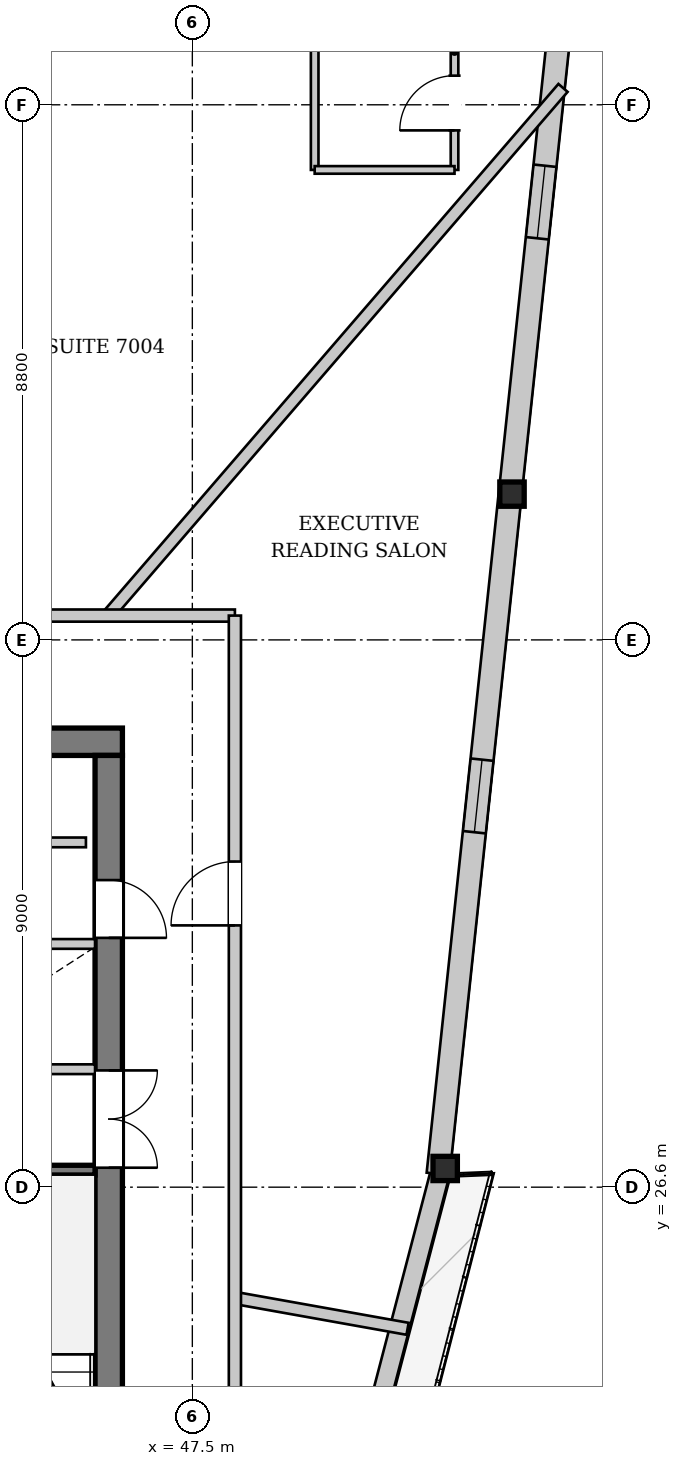
"""IFC4 building model, lengths in metres.
Left out: names, types, materials, properties, quantities, classifications, styles, units other than length and angle.
Written with IfcOpenShell. Run it as: python <this file> out.ifc"""

import sys

from ifc_helpers import new_model, si_unit, direction, frame, frame_2d, origin, origin_2d, place, context, subcontext, project, spatial, rectangle, i_section, extrude, source, transform, mapped, element, fill, save


model = new_model("IFC4")
c1 = context("Model", 3, precision=1e-05, world=origin(), true_north=direction((0.0, 1.0)))
c2 = subcontext(c1, "Body", "Model", "MODEL_VIEW")
j1 = project(units=[si_unit("LENGTHUNIT", "METRE"), si_unit("PLANEANGLEUNIT", "RADIAN")], contexts=[c1])
p1 = place(None, origin())
s1 = spatial("IfcSite", under=j1, at=p1, CompositionType="ELEMENT")
p2 = place(p1, origin())
s2 = spatial("IfcBuilding", under=s1, at=p2, CompositionType="ELEMENT")
p3 = place(p2, frame((0.0, 0.0, 263.3)))
s3 = spatial("IfcBuildingStorey", under=s2, at=p3, CompositionType="ELEMENT", Elevation=263.3)
m1 = source(origin(), c2, "Body", "SweptSolid", [
    extrude(i_section(OverallWidth=0.401, OverallDepth=0.399, WebThickness=0.022, FlangeThickness=0.034, at=origin_2d()), origin(), (0.0, 0.0, 1.0), 3.445),
])
p4 = place(p3, frame((51.732, 26.798, 0.0), z_axis=(-0.042519230303, 0.063495383919, 0.997075950605), x_axis=(-0.830907176976, -0.55641105601, 0.0)))
e1 = element("IfcColumn", 1, at=p4, inside=s3, PredefinedType="COLUMN", context=c2, shape_type="MappedRepresentation", body=[
    mapped(m1, transform((0.0, 0.0, 0.0), x_axis=(1.0, 0.0, 0.0), y_axis=(0.0, 1.0, 0.0), z_axis=(0.0, 0.0, 1.0), scale=1.0)),
])
m2 = source(origin(), c2, "Body", "SweptSolid", [
    extrude(i_section(OverallWidth=0.401, OverallDepth=0.399, WebThickness=0.022, FlangeThickness=0.034, at=origin_2d()), origin(), (0.0, 0.0, 1.0), 3.454),
])
p5 = place(p3, frame((52.908, 37.897, 0.0), z_axis=(-0.087222439843, 0.057889123364, 0.994505452667), x_axis=(-0.552985061708, -0.833191167457, 0.0)))
e2 = element("IfcColumn", 2, at=p5, inside=s3, PredefinedType="COLUMN", context=c2, shape_type="MappedRepresentation", body=[
    mapped(m2, transform((0.0, 0.0, 0.0), x_axis=(1.0, 0.0, 0.0), y_axis=(0.0, 1.0, 0.0), z_axis=(0.0, 0.0, 1.0), scale=1.0)),
])
p6 = place(p3, frame((51.577, 26.839, 0.0), z_axis=(0.0, 0.0, 1.0), x_axis=(-0.252928525252, -0.967484966867, 0.0)))
e3 = element("IfcWall", 3, at=p6, inside=s3, PredefinedType="SOLIDWALL", context=c2, shape_type="SweptSolid", body=[
    extrude(rectangle(XDim=22.323, YDim=0.32, at=frame_2d((11.161, 0.0))), origin(), (0.0, 0.0, 1.0), 2.872),
])
p7 = place(p6, frame((6.393, 0.0, 0.0)))
e4 = element("IfcOpeningElement", 4, at=p7, cuts=e3, PredefinedType="OPENING", context=c2, shape_type="SweptSolid", body=[
    extrude(rectangle(XDim=1.5, YDim=2.3, at=frame_2d((0.75, 1.15))), frame((0.0, 0.17, 0.0), z_axis=(0.0, -1.0, 0.0), x_axis=(1.0, 0.0, 0.0)), (0.0, 0.0, 1.0), 0.34),
])
p8 = place(p6, frame((15.219, 0.0, 0.402)))
e5 = element("IfcOpeningElement", 5, at=p8, cuts=e3, PredefinedType="OPENING", context=c2, shape_type="SweptSolid", body=[
    extrude(rectangle(XDim=2.6, YDim=2.35, at=frame_2d((1.3, 1.175))), frame((0.0, 0.17, 0.0), z_axis=(0.0, -1.0, 0.0), x_axis=(1.0, 0.0, 0.0)), (0.0, 0.0, 1.0), 0.34),
])
p9 = place(p3, frame((33.346, 39.708, 0.0), z_axis=(0.0, 0.0, 1.0), x_axis=(0.884171130731, 0.467163153066, 0.0)))
e6 = element("IfcWall", 6, at=p9, inside=s3, PredefinedType="SOLIDWALL", context=c2, shape_type="SweptSolid", body=[
    extrude(rectangle(XDim=21.802, YDim=0.32, at=frame_2d((10.901, 0.0))), origin(), (0.0, 0.0, 1.0), 2.872),
])
p10 = place(p9, frame((6.227, 0.0, 0.0)))
e7 = element("IfcOpeningElement", 7, at=p10, cuts=e6, PredefinedType="OPENING", context=c2, shape_type="SweptSolid", body=[
    extrude(rectangle(XDim=1.5, YDim=2.3, at=frame_2d((0.75, 1.15))), frame((0.0, 0.17, 0.0), z_axis=(0.0, -1.0, 0.0), x_axis=(1.0, 0.0, 0.0)), (0.0, 0.0, 1.0), 0.34),
])
p11 = place(p9, frame((14.834, 0.0, 0.402)))
e8 = element("IfcOpeningElement", 8, at=p11, cuts=e6, PredefinedType="OPENING", context=c2, shape_type="SweptSolid", body=[
    extrude(rectangle(XDim=2.6, YDim=2.35, at=frame_2d((1.3, 1.175))), frame((0.0, 0.17, 0.0), z_axis=(0.0, -1.0, 0.0), x_axis=(1.0, 0.0, 0.0)), (0.0, 0.0, 1.0), 0.34),
])
p12 = place(p3, frame((53.896, 49.017, 0.0), z_axis=(0.0, 0.0, 1.0), x_axis=(-0.105399254058, -0.994429986095, 0.0)))
e9 = element("IfcWall", 9, at=p12, inside=s3, PredefinedType="SOLIDWALL", context=c2, shape_type="SweptSolid", body=[
    extrude(rectangle(XDim=22.323, YDim=0.38, at=frame_2d((11.161, 0.0))), origin(), (0.0, 0.0, 1.0), 2.872),
])
p13 = place(p12, frame((5.65, 0.0, 0.65)))
e10 = element("IfcOpeningElement", 10, at=p13, cuts=e9, PredefinedType="OPENING", context=c2, shape_type="SweptSolid", body=[
    extrude(rectangle(XDim=1.2, YDim=1.5, at=frame_2d((0.6, 0.75))), frame((0.0, 0.2, 0.0), z_axis=(0.0, -1.0, 0.0), x_axis=(1.0, 0.0, 0.0)), (0.0, 0.0, 1.0), 0.4),
])
p14 = place(p12, frame((15.472, 0.0, 0.65)))
e11 = element("IfcOpeningElement", 11, at=p14, cuts=e9, PredefinedType="OPENING", context=c2, shape_type="SweptSolid", body=[
    extrude(rectangle(XDim=1.2, YDim=1.5, at=frame_2d((0.6, 0.75))), frame((0.0, 0.2, 0.0), z_axis=(0.0, -1.0, 0.0), x_axis=(1.0, 0.0, 0.0)), (0.0, 0.0, 1.0), 0.4),
])
p15 = place(p3, frame((29.65, 33.925, 0.0), z_axis=(0.0, 0.0, 1.0), x_axis=(1.0, 0.0, 0.0)))
e12 = element("IfcWall", 12, at=p15, inside=s3, PredefinedType="SHEAR", context=c2, shape_type="SweptSolid", body=[
    extrude(rectangle(XDim=16.7, YDim=0.45, at=frame_2d((8.35, 0.0))), origin(), (0.0, 0.0, 1.0), 3.38),
])
p16 = place(p15, frame((1.45, 0.0, 0.0)))
e13 = element("IfcOpeningElement", 13, at=p16, cuts=e12, PredefinedType="OPENING", context=c2, shape_type="SweptSolid", body=[
    extrude(rectangle(XDim=0.95, YDim=2.1, at=frame_2d((0.475, 1.05))), frame((0.0, 0.235, 0.0), z_axis=(0.0, -1.0, 0.0), x_axis=(1.0, 0.0, 0.0)), (0.0, 0.0, 1.0), 0.47),
])
p17 = place(p15, frame((3.83, 0.0, 0.0)))
e14 = element("IfcOpeningElement", 14, at=p17, cuts=e12, PredefinedType="OPENING", context=c2, shape_type="SweptSolid", body=[
    extrude(rectangle(XDim=1.32, YDim=2.2, at=frame_2d((0.66, 1.1))), frame((0.0, 0.235, 0.0), z_axis=(0.0, -1.0, 0.0), x_axis=(1.0, 0.0, 0.0)), (0.0, 0.0, 1.0), 0.47),
])
p18 = place(p3, frame((46.125, 33.7, 0.0), z_axis=(0.0, 0.0, 1.0), x_axis=(0.0, -1.0, 0.0)))
e15 = element("IfcWall", 15, at=p18, inside=s3, PredefinedType="SHEAR", context=c2, shape_type="SweptSolid", body=[
    extrude(rectangle(XDim=14.2, YDim=0.45, at=frame_2d((7.1, 0.0))), origin(), (0.0, 0.0, 1.0), 3.38),
])
p19 = place(p18, frame((5.18, 0.0, 0.0)))
e16 = element("IfcOpeningElement", 16, at=p19, cuts=e15, PredefinedType="OPENING", context=c2, shape_type="SweptSolid", body=[
    extrude(rectangle(XDim=1.6, YDim=2.2, at=frame_2d((0.8, 1.1))), frame((0.0, 0.235, 0.0), z_axis=(0.0, -1.0, 0.0), x_axis=(1.0, 0.0, 0.0)), (0.0, 0.0, 1.0), 0.47),
])
p20 = place(p18, frame((2.05, 0.0, 0.0)))
e17 = element("IfcOpeningElement", 17, at=p20, cuts=e15, PredefinedType="OPENING", context=c2, shape_type="SweptSolid", body=[
    extrude(rectangle(XDim=0.95, YDim=2.1, at=frame_2d((0.475, 1.05))), frame((0.0, 0.235, 0.0), z_axis=(0.0, -1.0, 0.0), x_axis=(1.0, 0.0, 0.0)), (0.0, 0.0, 1.0), 0.47),
])
p21 = place(p3, frame((42.88, 26.88, 0.0), z_axis=(0.0, 0.0, 1.0), x_axis=(1.0, 0.0, 0.0)))
e18 = element("IfcWall", 18, at=p21, inside=s3, PredefinedType="PARTITIONING", context=c2, shape_type="SweptSolid", body=[
    extrude(rectangle(XDim=3.02, YDim=0.16, at=frame_2d((1.51, 0.0))), origin(), (0.0, 0.0, 1.0), 3.38),
])
p22 = place(p3, frame((33.28, 28.54, 0.0), z_axis=(0.0, 0.0, 1.0), x_axis=(1.0, 0.0, 0.0)))
e19 = element("IfcWall", 19, at=p22, inside=s3, PredefinedType="PARTITIONING", context=c2, shape_type="SweptSolid", body=[
    extrude(rectangle(XDim=12.62, YDim=0.16, at=frame_2d((6.31, 0.0))), origin(), (0.0, 0.0, 1.0), 3.38),
])
p23 = place(p22, frame((0.26, 0.0, 0.0)))
e20 = element("IfcOpeningElement", 20, at=p23, cuts=e19, PredefinedType="OPENING", context=c2, shape_type="SweptSolid", body=[
    extrude(rectangle(XDim=1.1, YDim=2.2, at=frame_2d((0.55, 1.1))), frame((0.0, 0.09, 0.0), z_axis=(0.0, -1.0, 0.0), x_axis=(1.0, 0.0, 0.0)), (0.0, 0.0, 1.0), 0.18),
])
p24 = place(p22, frame((2.01, 0.0, 0.0)))
e21 = element("IfcOpeningElement", 21, at=p24, cuts=e19, PredefinedType="OPENING", context=c2, shape_type="SweptSolid", body=[
    extrude(rectangle(XDim=1.1, YDim=2.2, at=frame_2d((0.55, 1.1))), frame((0.0, 0.09, 0.0), z_axis=(0.0, -1.0, 0.0), x_axis=(1.0, 0.0, 0.0)), (0.0, 0.0, 1.0), 0.18),
])
p25 = place(p22, frame((3.76, 0.0, 0.0)))
e22 = element("IfcOpeningElement", 22, at=p25, cuts=e19, PredefinedType="OPENING", context=c2, shape_type="SweptSolid", body=[
    extrude(rectangle(XDim=1.1, YDim=2.2, at=frame_2d((0.55, 1.1))), frame((0.0, 0.09, 0.0), z_axis=(0.0, -1.0, 0.0), x_axis=(1.0, 0.0, 0.0)), (0.0, 0.0, 1.0), 0.18),
])
p26 = place(p3, frame((40.72, 30.6, 0.0), z_axis=(0.0, 0.0, 1.0), x_axis=(1.0, 0.0, 0.0)))
e23 = element("IfcWall", 23, at=p26, inside=s3, PredefinedType="PARTITIONING", context=c2, shape_type="SweptSolid", body=[
    extrude(rectangle(XDim=5.18, YDim=0.16, at=frame_2d((2.59, 0.0))), origin(), (0.0, 0.0, 1.0), 3.38),
])
p27 = place(p3, frame((40.72, 32.27, 0.0), z_axis=(0.0, 0.0, 1.0), x_axis=(1.0, 0.0, 0.0)))
e24 = element("IfcWall", 24, at=p27, inside=s3, PredefinedType="PARTITIONING", context=c2, shape_type="SweptSolid", body=[
    extrude(rectangle(XDim=5.03, YDim=0.16, at=frame_2d((2.515, 0.0))), origin(), (0.0, 0.0, 1.0), 3.38),
])
p28 = place(p27, frame((2.1, 0.0, 0.0)))
e25 = element("IfcOpeningElement", 25, at=p28, cuts=e24, PredefinedType="OPENING", context=c2, shape_type="SweptSolid", body=[
    extrude(rectangle(XDim=0.95, YDim=2.1, at=frame_2d((0.475, 1.05))), frame((0.0, 0.09, 0.0), z_axis=(0.0, -1.0, 0.0), x_axis=(1.0, 0.0, 0.0)), (0.0, 0.0, 1.0), 0.18),
])
p29 = place(p3, frame((48.2, 24.778, 0.0), z_axis=(0.0, 0.0, 1.0), x_axis=(0.984415019737, -0.175860936298, 0.0)))
e26 = element("IfcWall", 26, at=p29, inside=s3, PredefinedType="PARTITIONING", context=c2, shape_type="SweptSolid", body=[
    extrude(rectangle(XDim=2.885, YDim=0.2, at=frame_2d((1.442, 0.0))), origin(), (0.0, 0.0, 1.0), 3.38),
])
p30 = place(p3, frame((46.11, 36.0, 0.0), z_axis=(0.0, 0.0, 1.0), x_axis=(0.653228227984, 0.757161067518, 0.0)))
e27 = element("IfcWall", 27, at=p30, inside=s3, PredefinedType="PARTITIONING", context=c2, shape_type="SweptSolid", body=[
    extrude(rectangle(XDim=11.461, YDim=0.2, at=frame_2d((5.73, 0.0))), origin(), (0.0, 0.0, 1.0), 3.38),
])
p31 = place(p3, frame((51.812, 43.329, 0.0), z_axis=(0.0, 0.0, 1.0), x_axis=(0.0, 1.0, 0.0)))
e28 = element("IfcWall", 28, at=p31, inside=s3, PredefinedType="PARTITIONING", context=c2, shape_type="SweptSolid", body=[
    extrude(rectangle(XDim=2.2, YDim=0.125, at=frame_2d((1.1, 0.0))), origin(), (0.0, 0.0, 1.0), 3.38),
])
p32 = place(p31, frame((0.65, 0.0, 0.0)))
e29 = element("IfcOpeningElement", 29, at=p32, cuts=e28, PredefinedType="OPENING", context=c2, shape_type="SweptSolid", body=[
    extrude(rectangle(XDim=0.9, YDim=2.1, at=frame_2d((0.45, 1.05))), frame((0.0, 0.073, 0.0), z_axis=(0.0, -1.0, 0.0), x_axis=(1.0, 0.0, 0.0)), (0.0, 0.0, 1.0), 0.145),
])
p33 = place(p3, frame((49.512, 45.529, 0.0), z_axis=(0.0, 0.0, 1.0), x_axis=(0.0, -1.0, 0.0)))
e30 = element("IfcWall", 30, at=p33, inside=s3, PredefinedType="PARTITIONING", context=c2, shape_type="SweptSolid", body=[
    extrude(rectangle(XDim=2.2, YDim=0.125, at=frame_2d((1.1, 0.0))), origin(), (0.0, 0.0, 1.0), 3.055),
])
p34 = place(p3, frame((49.512, 43.329, 0.0), z_axis=(0.0, 0.0, 1.0), x_axis=(1.0, 0.0, 0.0)))
e31 = element("IfcWall", 31, at=p34, inside=s3, PredefinedType="PARTITIONING", context=c2, shape_type="SweptSolid", body=[
    extrude(rectangle(XDim=2.3, YDim=0.125, at=frame_2d((1.15, 0.0))), origin(), (0.0, 0.0, 1.0), 3.38),
])
p35 = place(p3, frame((43.4, 36.0, 0.0), z_axis=(0.0, 0.0, 1.0), x_axis=(1.0, 0.0, 0.0)))
e32 = element("IfcWall", 32, at=p35, inside=s3, PredefinedType="PARTITIONING", context=c2, shape_type="SweptSolid", body=[
    extrude(rectangle(XDim=4.8, YDim=0.2, at=frame_2d((2.4, 0.0))), origin(), (0.0, 0.0, 1.0), 3.38),
])
p36 = place(p3, frame((48.2, 17.2, 0.0), z_axis=(0.0, 0.0, 1.0), x_axis=(0.0, 1.0, 0.0)))
e33 = element("IfcWall", 33, at=p36, inside=s3, PredefinedType="PARTITIONING", context=c2, shape_type="SweptSolid", body=[
    extrude(rectangle(XDim=18.8, YDim=0.2, at=frame_2d((9.4, 0.0))), origin(), (0.0, 0.0, 1.0), 3.005),
])
p37 = place(p36, frame((0.3, 0.0, 0.0)))
e34 = element("IfcOpeningElement", 34, at=p37, cuts=e33, PredefinedType="OPENING", context=c2, shape_type="SweptSolid", body=[
    extrude(rectangle(XDim=1.05, YDim=2.2, at=frame_2d((0.525, 1.1))), frame((0.0, 0.11, 0.0), z_axis=(0.0, -1.0, 0.0), x_axis=(1.0, 0.0, 0.0)), (0.0, 0.0, 1.0), 0.22),
])
p38 = place(p36, frame((13.705, 0.0, 0.0)))
e35 = element("IfcOpeningElement", 35, at=p38, cuts=e33, PredefinedType="OPENING", context=c2, shape_type="SweptSolid", body=[
    extrude(rectangle(XDim=1.05, YDim=2.2, at=frame_2d((0.525, 1.1))), frame((0.0, 0.11, 0.0), z_axis=(0.0, -1.0, 0.0), x_axis=(1.0, 0.0, 0.0)), (0.0, 0.0, 1.0), 0.22),
])
m3 = source(origin(), c2, "Body", "SweptSolid", [
    extrude(rectangle(XDim=1.2, YDim=1.5, at=frame_2d((0.6, 0.75))), frame((0.0, 0.03, 0.0), z_axis=(0.0, -1.0, 0.0), x_axis=(1.0, 0.0, 0.0)), (0.0, 0.0, 1.0), 0.06),
])
p39 = place(p13, origin())
e36 = element("IfcWindow", 36, at=p39, inside=s3, PartitioningType="SINGLE_PANEL", PredefinedType="WINDOW", context=c2, shape_type="MappedRepresentation", body=[
    mapped(m3, transform((0.0, 0.0, 0.0), x_axis=(1.0, 0.0, 0.0), y_axis=(0.0, 1.0, 0.0), z_axis=(0.0, 0.0, 1.0), scale=1.0)),
])
fill(e10, e36)
p40 = place(p14, origin())
e37 = element("IfcWindow", 37, at=p40, inside=s3, PartitioningType="SINGLE_PANEL", PredefinedType="WINDOW", context=c2, shape_type="MappedRepresentation", body=[
    mapped(m3, transform((0.0, 0.0, 0.0), x_axis=(1.0, 0.0, 0.0), y_axis=(0.0, 1.0, 0.0), z_axis=(0.0, 0.0, 1.0), scale=1.0)),
])
fill(e11, e37)
m4 = source(origin(), c2, "Body", "SweptSolid", [
    extrude(rectangle(XDim=1.6, YDim=2.2, at=frame_2d((0.8, 1.1))), frame((0.0, 0.025, 0.0), z_axis=(0.0, -1.0, 0.0), x_axis=(1.0, 0.0, 0.0)), (0.0, 0.0, 1.0), 0.05),
])
p41 = place(p19, origin())
e38 = element("IfcDoor", 38, at=p41, inside=s3, OperationType="DOUBLE_DOOR_SINGLE_SWING", PredefinedType="DOOR", context=c2, shape_type="MappedRepresentation", body=[
    mapped(m4, transform((0.0, 0.0, 0.0), x_axis=(1.0, 0.0, 0.0), y_axis=(0.0, 1.0, 0.0), z_axis=(0.0, 0.0, 1.0), scale=1.0)),
])
fill(e16, e38)
m5 = source(origin(), c2, "Body", "SweptSolid", [
    extrude(rectangle(XDim=0.95, YDim=2.1, at=frame_2d((0.475, 1.05))), frame((0.0, 0.025, 0.0), z_axis=(0.0, -1.0, 0.0), x_axis=(1.0, 0.0, 0.0)), (0.0, 0.0, 1.0), 0.05),
])
p42 = place(p20, origin())
e39 = element("IfcDoor", 39, at=p42, inside=s3, OperationType="SINGLE_SWING_RIGHT", PredefinedType="DOOR", context=c2, shape_type="MappedRepresentation", body=[
    mapped(m5, transform((0.0, 0.0, 0.0), x_axis=(1.0, 0.0, 0.0), y_axis=(0.0, 1.0, 0.0), z_axis=(0.0, 0.0, 1.0), scale=1.0)),
])
fill(e17, e39)
m6 = source(origin(), c2, "Body", "SweptSolid", [
    extrude(rectangle(XDim=0.9, YDim=2.1, at=frame_2d((0.45, 1.05))), frame((0.0, 0.025, 0.0), z_axis=(0.0, -1.0, 0.0), x_axis=(1.0, 0.0, 0.0)), (0.0, 0.0, 1.0), 0.05),
])
p43 = place(p32, origin())
e40 = element("IfcDoor", 40, at=p43, inside=s3, OperationType="SINGLE_SWING_LEFT", PredefinedType="DOOR", context=c2, shape_type="MappedRepresentation", body=[
    mapped(m6, transform((0.0, 0.0, 0.0), x_axis=(1.0, 0.0, 0.0), y_axis=(0.0, 1.0, 0.0), z_axis=(0.0, 0.0, 1.0), scale=1.0)),
])
fill(e29, e40)
m7 = source(origin(), c2, "Body", "SweptSolid", [
    extrude(rectangle(XDim=1.05, YDim=2.2, at=frame_2d((0.525, 1.1))), frame((0.0, 0.025, 0.0), z_axis=(0.0, -1.0, 0.0), x_axis=(1.0, 0.0, 0.0)), (0.0, 0.0, 1.0), 0.05),
])
p44 = place(p38, origin())
e41 = element("IfcDoor", 41, at=p44, inside=s3, OperationType="SINGLE_SWING_LEFT", PredefinedType="DOOR", context=c2, shape_type="MappedRepresentation", body=[
    mapped(m7, transform((0.0, 0.0, 0.0), x_axis=(1.0, 0.0, 0.0), y_axis=(0.0, 1.0, 0.0), z_axis=(0.0, 0.0, 1.0), scale=1.0)),
])
fill(e35, e41)
save(model, sys.argv[1])
